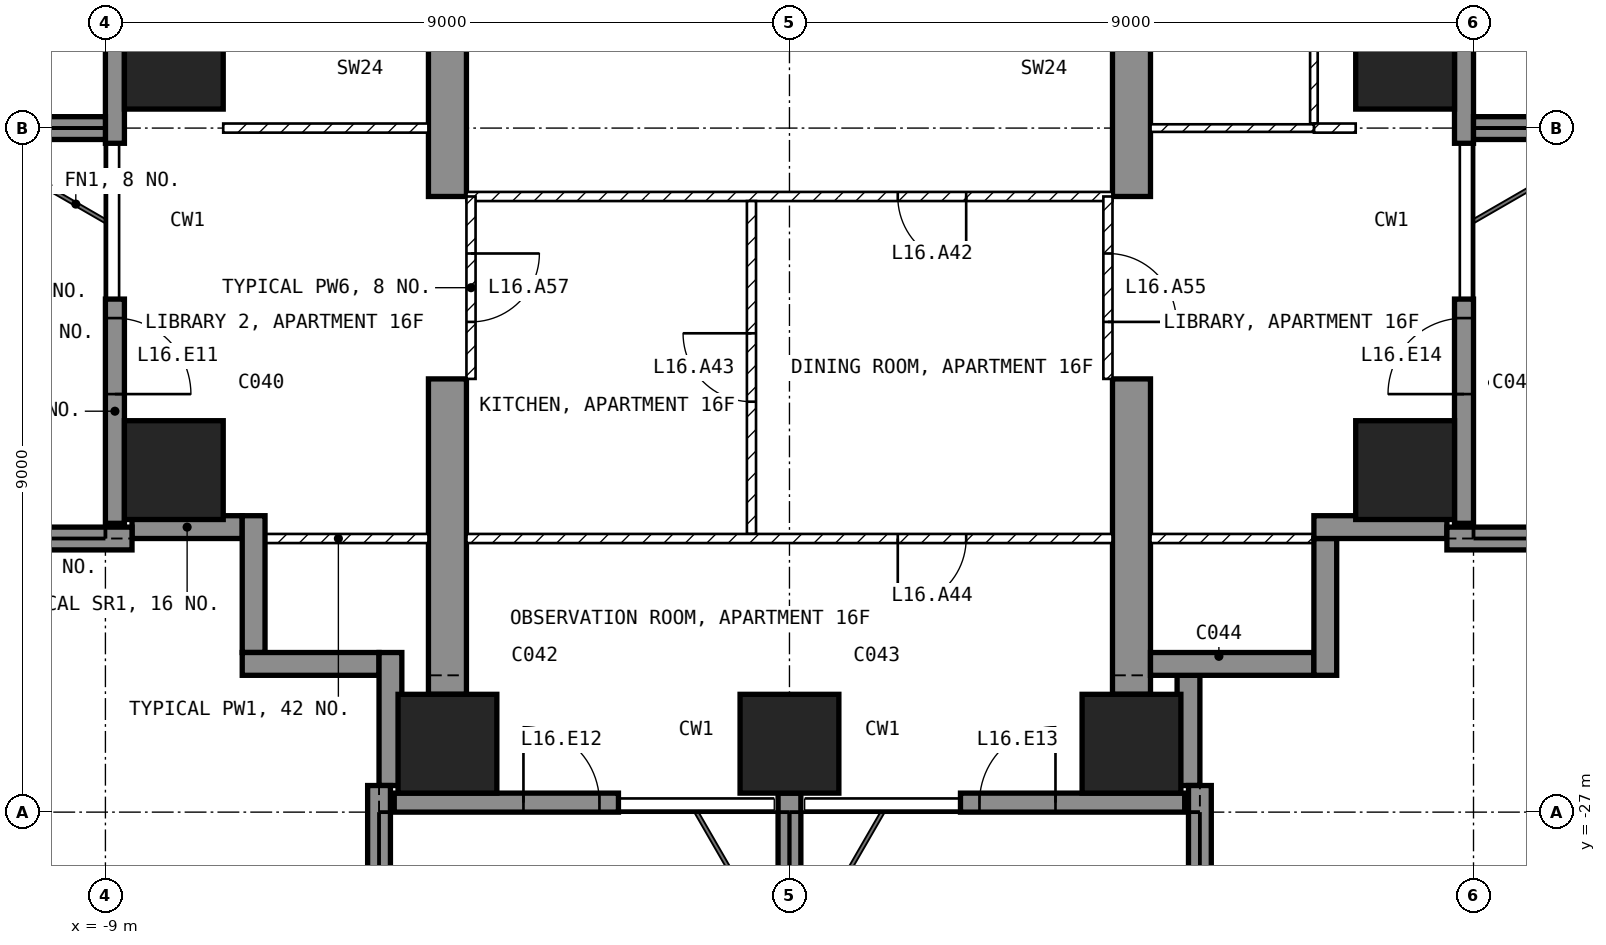
"""IFC4 building model, lengths in metres.
Left out: names, types, materials, properties, quantities, classifications, styles, units other than length and angle.
Written with IfcOpenShell. Run it as: python <this file> out.ifc"""

import sys

from ifc_helpers import new_model, si_unit, direction, frame, frame_2d, origin, origin_2d, place, context, subcontext, project, spatial, polyline, rectangle, outline, extrude, element, fill, save


model = new_model("IFC4")
c1 = context("Model", 3, precision=1e-05, world=origin(), true_north=direction((0.0, 1.0)))
c2 = subcontext(c1, "Body", "Model", "MODEL_VIEW")
j1 = project(units=[si_unit("LENGTHUNIT", "METRE"), si_unit("PLANEANGLEUNIT", "RADIAN")], contexts=[c1])
p1 = place(None, origin())
s1 = spatial("IfcSite", under=j1, at=p1, CompositionType="ELEMENT")
p2 = place(p1, origin())
s2 = spatial("IfcBuilding", under=s1, at=p2, CompositionType="ELEMENT")
p3 = place(p2, frame((0.0, 0.0, 75.0)))
s3 = spatial("IfcBuildingStorey", under=s2, at=p3, CompositionType="ELEMENT", Elevation=75.0)
for number, where, z_axis, x_axis in (
    (1, (-8.1, -22.5, -0.25), (0.0, 0.0, 1.0), (1.0, 0.0, 0.0)),
    (2, (-8.1, -17.1, -0.25), (0.0, 0.0, 1.0), (1.0, 0.0, 0.0)),
    (3, (-4.5, -26.1, -0.25), (0.0, 0.0, 1.0), (1.0, 0.0, 0.0)),
    (4, (0.0, -26.1, -0.25), (0.0, 0.0, 1.0), (1.0, 0.0, 0.0)),
    (5, (4.5, -26.1, -0.25), (0.0, 0.0, 1.0), (1.0, 0.0, 0.0)),
    (6, (8.1, -22.5, -0.25), (0.0, 0.0, 1.0), (1.0, 0.0, 0.0)),
    (7, (8.1, -17.1, -0.25), (0.0, 0.0, 1.0), (1.0, 0.0, 0.0)),
):
    element("IfcColumn", number, at=place(p3, frame(where, z_axis=z_axis, x_axis=x_axis)), inside=s3, PredefinedType="COLUMN", context=c2, shape_type="SweptSolid", body=[
        extrude(rectangle(XDim=1.3, YDim=1.3, at=origin_2d()), origin(), (0.0, 0.0, 1.0), 3.5),
    ])
for number, where, z_axis, x_axis in (
    (8, (-4.75, -25.45, -0.25), (1.0, 0.0, 0.0), (0.0, 1.0, 0.0)),
    (9, (4.25, -25.45, -0.25), (1.0, 0.0, 0.0), (0.0, 1.0, 0.0)),
):
    element("IfcWall", number, at=place(p3, frame(where, z_axis=z_axis, x_axis=x_axis)), inside=s3, PredefinedType="SHEAR", context=c2, shape_type="SweptSolid", body=[
        extrude(outline(polyline([(0.0, 0.0), (4.15, 0.0), (4.15, 2.65), (6.55, 2.65), (6.55, 0.0), (11.95, 0.0), (11.95, 2.65), (14.35, 2.65), (14.35, 0.0), (16.45, 0.0), (16.45, 3.5), (0.0, 3.5), (0.0, 0.0)])), origin(), (0.0, 0.0, 1.0), 0.5),
    ])
p4 = place(p3, frame((-8.875, -14.65, 0.0), z_axis=(0.0, 0.0, 1.0), x_axis=(0.0, -1.0, 0.0)))
e10 = element("IfcWall", 10, at=p4, inside=s3, PredefinedType="SOLIDWALL", context=c2, shape_type="SweptSolid", body=[
    extrude(rectangle(XDim=3.55, YDim=0.25, at=frame_2d((1.775, 0.0))), origin(), (0.0, 0.0, 1.0), 3.25),
])
p5 = place(p4, frame((0.25, 0.0, 0.0)))
e11 = element("IfcOpeningElement", 11, at=p5, cuts=e10, PredefinedType="OPENING", context=c2, shape_type="SweptSolid", body=[
    extrude(rectangle(XDim=1.2, YDim=2.4, at=frame_2d((0.6, 1.2))), frame((0.0, 0.135, 0.0), z_axis=(0.0, -1.0, 0.0), x_axis=(1.0, 0.0, 0.0)), (0.0, 0.0, 1.0), 0.27),
])
p6 = place(p3, frame((-8.875, -20.25, 0.0), z_axis=(0.0, 0.0, 1.0), x_axis=(0.0, -1.0, 0.0)))
e12 = element("IfcWall", 12, at=p6, inside=s3, PredefinedType="SOLIDWALL", context=c2, shape_type="SweptSolid", body=[
    extrude(rectangle(XDim=2.95, YDim=0.25, at=frame_2d((1.475, 0.0))), origin(), (0.0, 0.0, 1.0), 3.25),
])
p7 = place(p6, frame((0.25, 0.0, 0.0)))
e13 = element("IfcOpeningElement", 13, at=p7, cuts=e12, PredefinedType="OPENING", context=c2, shape_type="SweptSolid", body=[
    extrude(rectangle(XDim=1.0, YDim=2.4, at=frame_2d((0.5, 1.2))), frame((0.0, 0.135, 0.0), z_axis=(0.0, -1.0, 0.0), x_axis=(1.0, 0.0, 0.0)), (0.0, 0.0, 1.0), 0.27),
])
p8 = place(p3, frame((-5.2, -26.875, 0.0), z_axis=(0.0, 0.0, 1.0), x_axis=(1.0, 0.0, 0.0)))
e14 = element("IfcWall", 14, at=p8, inside=s3, PredefinedType="SOLIDWALL", context=c2, shape_type="SweptSolid", body=[
    extrude(rectangle(XDim=2.95, YDim=0.25, at=frame_2d((1.475, 0.0))), origin(), (0.0, 0.0, 1.0), 3.25),
])
p9 = place(p8, frame((1.7, 0.0, 0.0)))
e15 = element("IfcOpeningElement", 15, at=p9, cuts=e14, PredefinedType="OPENING", context=c2, shape_type="SweptSolid", body=[
    extrude(rectangle(XDim=1.0, YDim=2.4, at=frame_2d((0.5, 1.2))), frame((0.0, 0.135, 0.0), z_axis=(0.0, -1.0, 0.0), x_axis=(1.0, 0.0, 0.0)), (0.0, 0.0, 1.0), 0.27),
])
p10 = place(p3, frame((2.25, -26.875, 0.0), z_axis=(0.0, 0.0, 1.0), x_axis=(1.0, 0.0, 0.0)))
e16 = element("IfcWall", 16, at=p10, inside=s3, PredefinedType="SOLIDWALL", context=c2, shape_type="SweptSolid", body=[
    extrude(rectangle(XDim=2.95, YDim=0.25, at=frame_2d((1.475, 0.0))), origin(), (0.0, 0.0, 1.0), 3.25),
])
p11 = place(p10, frame((0.25, 0.0, 0.0)))
e17 = element("IfcOpeningElement", 17, at=p11, cuts=e16, PredefinedType="OPENING", context=c2, shape_type="SweptSolid", body=[
    extrude(rectangle(XDim=1.0, YDim=2.4, at=frame_2d((0.5, 1.2))), frame((0.0, 0.135, 0.0), z_axis=(0.0, -1.0, 0.0), x_axis=(1.0, 0.0, 0.0)), (0.0, 0.0, 1.0), 0.27),
])
p12 = place(p3, frame((8.875, -23.2, 0.0), z_axis=(0.0, 0.0, 1.0), x_axis=(0.0, 1.0, 0.0)))
e18 = element("IfcWall", 18, at=p12, inside=s3, PredefinedType="SOLIDWALL", context=c2, shape_type="SweptSolid", body=[
    extrude(rectangle(XDim=2.95, YDim=0.25, at=frame_2d((1.475, 0.0))), origin(), (0.0, 0.0, 1.0), 3.25),
])
p13 = place(p12, frame((1.7, 0.0, 0.0)))
e19 = element("IfcOpeningElement", 19, at=p13, cuts=e18, PredefinedType="OPENING", context=c2, shape_type="SweptSolid", body=[
    extrude(rectangle(XDim=1.0, YDim=2.4, at=frame_2d((0.5, 1.2))), frame((0.0, 0.135, 0.0), z_axis=(0.0, -1.0, 0.0), x_axis=(1.0, 0.0, 0.0)), (0.0, 0.0, 1.0), 0.27),
])
p14 = place(p3, frame((8.875, -18.2, 0.0), z_axis=(0.0, 0.0, 1.0), x_axis=(0.0, 1.0, 0.0)))
e20 = element("IfcWall", 20, at=p14, inside=s3, PredefinedType="SOLIDWALL", context=c2, shape_type="SweptSolid", body=[
    extrude(rectangle(XDim=3.55, YDim=0.25, at=frame_2d((1.775, 0.0))), origin(), (0.0, 0.0, 1.0), 3.25),
])
p15 = place(p14, frame((2.1, 0.0, 0.0)))
e21 = element("IfcOpeningElement", 21, at=p15, cuts=e20, PredefinedType="OPENING", context=c2, shape_type="SweptSolid", body=[
    extrude(rectangle(XDim=1.2, YDim=2.4, at=frame_2d((0.6, 1.2))), frame((0.0, 0.135, 0.0), z_axis=(0.0, -1.0, 0.0), x_axis=(1.0, 0.0, 0.0)), (0.0, 0.0, 1.0), 0.27),
])
p16 = place(p3, frame((5.25, -26.65, 0.0), z_axis=(0.0, 0.0, 1.0), x_axis=(0.0, 1.0, 0.0)))
e22 = element("IfcWall", 22, at=p16, inside=s3, PredefinedType="SOLIDWALL", context=c2, shape_type="SweptSolid", body=[
    extrude(rectangle(XDim=1.45, YDim=0.3, at=frame_2d((0.725, 0.0))), origin(), (0.0, 0.0, 1.0), 3.25),
])
p17 = place(p3, frame((4.75, -25.05, 0.0), z_axis=(0.0, 0.0, 1.0), x_axis=(1.0, 0.0, 0.0)))
e23 = element("IfcWall", 23, at=p17, inside=s3, PredefinedType="SOLIDWALL", context=c2, shape_type="SweptSolid", body=[
    extrude(rectangle(XDim=2.15, YDim=0.3, at=frame_2d((1.075, 0.0))), origin(), (0.0, 0.0, 1.0), 3.25),
])
p18 = place(p3, frame((7.05, -25.2, 0.0), z_axis=(0.0, 0.0, 1.0), x_axis=(0.0, 1.0, 0.0)))
e24 = element("IfcWall", 24, at=p18, inside=s3, PredefinedType="SOLIDWALL", context=c2, shape_type="SweptSolid", body=[
    extrude(rectangle(XDim=1.8, YDim=0.3, at=frame_2d((0.9, 0.0))), origin(), (0.0, 0.0, 1.0), 3.25),
])
p19 = place(p3, frame((6.9, -23.25, 0.0), z_axis=(0.0, 0.0, 1.0), x_axis=(1.0, 0.0, 0.0)))
e25 = element("IfcWall", 25, at=p19, inside=s3, PredefinedType="SOLIDWALL", context=c2, shape_type="SweptSolid", body=[
    extrude(rectangle(XDim=1.75, YDim=0.3, at=frame_2d((0.875, 0.0))), origin(), (0.0, 0.0, 1.0), 3.25),
])
p20 = place(p3, frame((-8.65, -23.25, 0.0), z_axis=(0.0, 0.0, 1.0), x_axis=(1.0, 0.0, 0.0)))
e26 = element("IfcWall", 26, at=p20, inside=s3, PredefinedType="SOLIDWALL", context=c2, shape_type="SweptSolid", body=[
    extrude(rectangle(XDim=1.45, YDim=0.3, at=frame_2d((0.725, 0.0))), origin(), (0.0, 0.0, 1.0), 3.25),
])
p21 = place(p3, frame((-7.05, -23.1, 0.0), z_axis=(0.0, 0.0, 1.0), x_axis=(0.0, -1.0, 0.0)))
e27 = element("IfcWall", 27, at=p21, inside=s3, PredefinedType="SOLIDWALL", context=c2, shape_type="SweptSolid", body=[
    extrude(rectangle(XDim=1.8, YDim=0.3, at=frame_2d((0.9, 0.0))), origin(), (0.0, 0.0, 1.0), 3.25),
])
p22 = place(p3, frame((-7.2, -25.05, 0.0), z_axis=(0.0, 0.0, 1.0), x_axis=(1.0, 0.0, 0.0)))
e28 = element("IfcWall", 28, at=p22, inside=s3, PredefinedType="SOLIDWALL", context=c2, shape_type="SweptSolid", body=[
    extrude(rectangle(XDim=1.8, YDim=0.3, at=frame_2d((0.9, 0.0))), origin(), (0.0, 0.0, 1.0), 3.25),
])
p23 = place(p3, frame((-5.25, -24.9, 0.0), z_axis=(0.0, 0.0, 1.0), x_axis=(0.0, -1.0, 0.0)))
e29 = element("IfcWall", 29, at=p23, inside=s3, PredefinedType="SOLIDWALL", context=c2, shape_type="SweptSolid", body=[
    extrude(rectangle(XDim=1.75, YDim=0.3, at=frame_2d((0.875, 0.0))), origin(), (0.0, 0.0, 1.0), 3.25),
])
p24 = place(p3, frame((-8.65, -23.4, 0.0), z_axis=(0.0, 0.0, 1.0), x_axis=(-1.0, 0.0, 0.0)))
e30 = element("IfcWall", 30, at=p24, inside=s3, PredefinedType="SOLIDWALL", context=c2, shape_type="SweptSolid", body=[
    extrude(rectangle(XDim=3.05, YDim=0.3, at=frame_2d((1.525, 0.0))), origin(), (0.0, 0.0, 1.0), 3.25),
])
p25 = place(p3, frame((-9.0, -18.0, 0.0), z_axis=(0.0, 0.0, 1.0), x_axis=(-1.0, 0.0, 0.0)))
e31 = element("IfcWall", 31, at=p25, inside=s3, PredefinedType="SOLIDWALL", context=c2, shape_type="SweptSolid", body=[
    extrude(rectangle(XDim=2.7, YDim=0.3, at=frame_2d((1.35, 0.0))), origin(), (0.0, 0.0, 1.0), 3.25),
])
p26 = place(p3, frame((-5.4, -26.65, 0.0), z_axis=(0.0, 0.0, 1.0), x_axis=(0.0, -1.0, 0.0)))
e32 = element("IfcWall", 32, at=p26, inside=s3, PredefinedType="SOLIDWALL", context=c2, shape_type="SweptSolid", body=[
    extrude(rectangle(XDim=3.05, YDim=0.3, at=frame_2d((1.525, 0.0))), origin(), (0.0, 0.0, 1.0), 3.25),
])
p27 = place(p3, frame((0.0, -26.75, 0.0), z_axis=(0.0, 0.0, 1.0), x_axis=(0.0, -1.0, 0.0)))
e33 = element("IfcWall", 33, at=p27, inside=s3, PredefinedType="SOLIDWALL", context=c2, shape_type="SweptSolid", body=[
    extrude(rectangle(XDim=2.95, YDim=0.3, at=frame_2d((1.475, 0.0))), origin(), (0.0, 0.0, 1.0), 3.25),
])
for number, where, z_axis, x_axis in (
    (34, (5.4, -26.65, 0.0), (0.0, 0.0, 1.0), (0.0, -1.0, 0.0)),
    (35, (8.65, -23.4, 0.0), (0.0, 0.0, 1.0), (1.0, 0.0, 0.0)),
):
    element("IfcWall", number, at=place(p3, frame(where, z_axis=z_axis, x_axis=x_axis)), inside=s3, PredefinedType="SOLIDWALL", context=c2, shape_type="SweptSolid", body=[
        extrude(rectangle(XDim=3.05, YDim=0.3, at=frame_2d((1.525, 0.0))), origin(), (0.0, 0.0, 1.0), 3.25),
    ])
p28 = place(p3, frame((9.0, -18.0, 0.0), z_axis=(0.0, 0.0, 1.0), x_axis=(1.0, 0.0, 0.0)))
e36 = element("IfcWall", 36, at=p28, inside=s3, PredefinedType="SOLIDWALL", context=c2, shape_type="SweptSolid", body=[
    extrude(rectangle(XDim=2.7, YDim=0.3, at=frame_2d((1.35, 0.0))), origin(), (0.0, 0.0, 1.0), 3.25),
])
p29 = place(p3, frame((4.25, -18.9, 0.0), z_axis=(0.0, 0.0, 1.0), x_axis=(-1.0, 0.0, 0.0)))
e37 = element("IfcWall", 37, at=p29, inside=s3, PredefinedType="PARTITIONING", context=c2, shape_type="SweptSolid", body=[
    extrude(rectangle(XDim=8.5, YDim=0.12, at=frame_2d((4.25, 0.0))), origin(), (0.0, 0.0, 1.0), 3.25),
])
p30 = place(p29, frame((1.925, 0.0, 0.0)))
e38 = element("IfcOpeningElement", 38, at=p30, cuts=e37, PredefinedType="OPENING", context=c2, shape_type="SweptSolid", body=[
    extrude(rectangle(XDim=0.9, YDim=2.1, at=frame_2d((0.45, 1.05))), frame((0.0, 0.07, 0.0), z_axis=(0.0, -1.0, 0.0), x_axis=(1.0, 0.0, 0.0)), (0.0, 0.0, 1.0), 0.14),
])
p31 = place(p3, frame((-0.5, -23.34, 0.0), z_axis=(0.0, 0.0, 1.0), x_axis=(0.0, 1.0, 0.0)))
e39 = element("IfcWall", 39, at=p31, inside=s3, PredefinedType="PARTITIONING", context=c2, shape_type="SweptSolid", body=[
    extrude(rectangle(XDim=4.38, YDim=0.12, at=frame_2d((2.19, 0.0))), origin(), (0.0, 0.0, 1.0), 3.25),
])
p32 = place(p31, frame((1.74, 0.0, 0.0)))
e40 = element("IfcOpeningElement", 40, at=p32, cuts=e39, PredefinedType="OPENING", context=c2, shape_type="SweptSolid", body=[
    extrude(rectangle(XDim=0.9, YDim=2.1, at=frame_2d((0.45, 1.05))), frame((0.0, 0.07, 0.0), z_axis=(0.0, -1.0, 0.0), x_axis=(1.0, 0.0, 0.0)), (0.0, 0.0, 1.0), 0.14),
])
p33 = place(p3, frame((4.25, -23.4, 0.0), z_axis=(0.0, 0.0, 1.0), x_axis=(-1.0, 0.0, 0.0)))
e41 = element("IfcWall", 41, at=p33, inside=s3, PredefinedType="PARTITIONING", context=c2, shape_type="SweptSolid", body=[
    extrude(rectangle(XDim=8.5, YDim=0.12, at=frame_2d((4.25, 0.0))), origin(), (0.0, 0.0, 1.0), 3.25),
])
p34 = place(p33, frame((1.925, 0.0, 0.0)))
e42 = element("IfcOpeningElement", 42, at=p34, cuts=e41, PredefinedType="OPENING", context=c2, shape_type="SweptSolid", body=[
    extrude(rectangle(XDim=0.9, YDim=2.1, at=frame_2d((0.45, 1.05))), frame((0.0, 0.07, 0.0), z_axis=(0.0, -1.0, 0.0), x_axis=(1.0, 0.0, 0.0)), (0.0, 0.0, 1.0), 0.14),
])
p35 = place(p3, frame((6.9, -17.94, 0.0), z_axis=(0.0, 0.0, 1.0), x_axis=(0.0, 1.0, 0.0)))
e43 = element("IfcWall", 43, at=p35, inside=s3, PredefinedType="PARTITIONING", context=c2, shape_type="SweptSolid", body=[
    extrude(rectangle(XDim=3.49, YDim=0.1, at=frame_2d((1.745, 0.0))), origin(), (0.0, 0.0, 1.0), 3.25),
])
p36 = place(p3, frame((7.45, -18.0, 0.0), z_axis=(0.0, 0.0, 1.0), x_axis=(-1.0, 0.0, 0.0)))
e44 = element("IfcWall", 44, at=p36, inside=s3, PredefinedType="PARTITIONING", context=c2, shape_type="SweptSolid", body=[
    extrude(rectangle(XDim=0.55, YDim=0.12, at=frame_2d((0.275, 0.0))), origin(), (0.0, 0.0, 1.0), 3.25),
])
p37 = place(p3, frame((6.9, -18.0, 0.0), z_axis=(0.0, 0.0, 1.0), x_axis=(-1.0, 0.0, 0.0)))
e45 = element("IfcWall", 45, at=p37, inside=s3, PredefinedType="PARTITIONING", context=c2, shape_type="SweptSolid", body=[
    extrude(rectangle(XDim=2.15, YDim=0.1, at=frame_2d((1.075, 0.0))), origin(), (0.0, 0.0, 1.0), 3.25),
])
p38 = place(p3, frame((7.12, -23.4, 0.0), z_axis=(0.0, 0.0, 1.0), x_axis=(-1.0, 0.0, 0.0)))
e46 = element("IfcWall", 46, at=p38, inside=s3, PredefinedType="PARTITIONING", context=c2, shape_type="SweptSolid", body=[
    extrude(rectangle(XDim=2.37, YDim=0.12, at=frame_2d((1.185, 0.0))), origin(), (0.0, 0.0, 1.0), 3.25),
])
p39 = place(p3, frame((-4.75, -18.0, 0.0), z_axis=(0.0, 0.0, 1.0), x_axis=(-1.0, 0.0, 0.0)))
e47 = element("IfcWall", 47, at=p39, inside=s3, PredefinedType="PARTITIONING", context=c2, shape_type="SweptSolid", body=[
    extrude(rectangle(XDim=2.7, YDim=0.12, at=frame_2d((1.35, 0.0))), origin(), (0.0, 0.0, 1.0), 3.25),
])
p40 = place(p3, frame((-4.75, -23.4, 0.0), z_axis=(0.0, 0.0, 1.0), x_axis=(-1.0, 0.0, 0.0)))
e48 = element("IfcWall", 48, at=p40, inside=s3, PredefinedType="PARTITIONING", context=c2, shape_type="SweptSolid", body=[
    extrude(rectangle(XDim=2.37, YDim=0.12, at=frame_2d((1.185, 0.0))), origin(), (0.0, 0.0, 1.0), 3.25),
])
p41 = place(p3, frame((4.19, -18.9, 0.0), z_axis=(0.0, 0.0, 1.0), x_axis=(0.0, -1.0, 0.0)))
e49 = element("IfcWall", 49, at=p41, inside=s3, PredefinedType="PARTITIONING", context=c2, shape_type="SweptSolid", body=[
    extrude(rectangle(XDim=2.4, YDim=0.12, at=frame_2d((1.2, 0.0))), origin(), (0.0, 0.0, 1.0), 2.4),
])
p42 = place(p41, frame((0.75, 0.0, 0.0)))
e50 = element("IfcOpeningElement", 50, at=p42, cuts=e49, PredefinedType="OPENING", context=c2, shape_type="SweptSolid", body=[
    extrude(rectangle(XDim=0.9, YDim=2.1, at=frame_2d((0.45, 1.05))), frame((0.0, 0.07, 0.0), z_axis=(0.0, -1.0, 0.0), x_axis=(1.0, 0.0, 0.0)), (0.0, 0.0, 1.0), 0.14),
])
p43 = place(p3, frame((-4.19, -18.9, 0.0), z_axis=(0.0, 0.0, 1.0), x_axis=(0.0, -1.0, 0.0)))
e51 = element("IfcWall", 51, at=p43, inside=s3, PredefinedType="PARTITIONING", context=c2, shape_type="SweptSolid", body=[
    extrude(rectangle(XDim=2.4, YDim=0.12, at=frame_2d((1.2, 0.0))), origin(), (0.0, 0.0, 1.0), 2.4),
])
p44 = place(p43, frame((0.75, 0.0, 0.0)))
e52 = element("IfcOpeningElement", 52, at=p44, cuts=e51, PredefinedType="OPENING", context=c2, shape_type="SweptSolid", body=[
    extrude(rectangle(XDim=0.9, YDim=2.1, at=frame_2d((0.45, 1.05))), frame((0.0, 0.07, 0.0), z_axis=(0.0, -1.0, 0.0), x_axis=(1.0, 0.0, 0.0)), (0.0, 0.0, 1.0), 0.14),
])
p45 = place(p7, origin())
e53 = element("IfcDoor", 53, at=p45, inside=s3, OperationType="SINGLE_SWING_RIGHT", PredefinedType="DOOR", context=c2, shape_type="SweptSolid", body=[
    extrude(rectangle(XDim=1.0, YDim=2.4, at=frame_2d((0.5, 1.2))), frame((0.0, 0.025, 0.0), z_axis=(0.0, -1.0, 0.0), x_axis=(1.0, 0.0, 0.0)), (0.0, 0.0, 1.0), 0.05),
])
fill(e13, e53)
p46 = place(p9, origin())
e54 = element("IfcDoor", 54, at=p46, inside=s3, OperationType="SINGLE_SWING_LEFT", PredefinedType="DOOR", context=c2, shape_type="SweptSolid", body=[
    extrude(rectangle(XDim=1.0, YDim=2.4, at=frame_2d((0.5, 1.2))), frame((0.0, 0.025, 0.0), z_axis=(0.0, -1.0, 0.0), x_axis=(1.0, 0.0, 0.0)), (0.0, 0.0, 1.0), 0.05),
])
fill(e15, e54)
p47 = place(p11, origin())
e55 = element("IfcDoor", 55, at=p47, inside=s3, OperationType="SINGLE_SWING_RIGHT", PredefinedType="DOOR", context=c2, shape_type="SweptSolid", body=[
    extrude(rectangle(XDim=1.0, YDim=2.4, at=frame_2d((0.5, 1.2))), frame((0.0, 0.025, 0.0), z_axis=(0.0, -1.0, 0.0), x_axis=(1.0, 0.0, 0.0)), (0.0, 0.0, 1.0), 0.05),
])
fill(e17, e55)
p48 = place(p13, origin())
e56 = element("IfcDoor", 56, at=p48, inside=s3, OperationType="SINGLE_SWING_LEFT", PredefinedType="DOOR", context=c2, shape_type="SweptSolid", body=[
    extrude(rectangle(XDim=1.0, YDim=2.4, at=frame_2d((0.5, 1.2))), frame((0.0, 0.025, 0.0), z_axis=(0.0, -1.0, 0.0), x_axis=(1.0, 0.0, 0.0)), (0.0, 0.0, 1.0), 0.05),
])
fill(e19, e56)
p49 = place(p30, origin())
e57 = element("IfcDoor", 57, at=p49, inside=s3, OperationType="SINGLE_SWING_LEFT", PredefinedType="DOOR", context=c2, shape_type="SweptSolid", body=[
    extrude(rectangle(XDim=0.9, YDim=2.1, at=frame_2d((0.45, 1.05))), frame((0.0, 0.025, 0.0), z_axis=(0.0, -1.0, 0.0), x_axis=(1.0, 0.0, 0.0)), (0.0, 0.0, 1.0), 0.05),
])
fill(e38, e57)
p50 = place(p32, origin())
e58 = element("IfcDoor", 58, at=p50, inside=s3, OperationType="SINGLE_SWING_RIGHT", PredefinedType="DOOR", context=c2, shape_type="SweptSolid", body=[
    extrude(rectangle(XDim=0.9, YDim=2.1, at=frame_2d((0.45, 1.05))), frame((0.0, 0.025, 0.0), z_axis=(0.0, -1.0, 0.0), x_axis=(1.0, 0.0, 0.0)), (0.0, 0.0, 1.0), 0.05),
])
fill(e40, e58)
p51 = place(p34, origin())
e59 = element("IfcDoor", 59, at=p51, inside=s3, OperationType="SINGLE_SWING_RIGHT", PredefinedType="DOOR", context=c2, shape_type="SweptSolid", body=[
    extrude(rectangle(XDim=0.9, YDim=2.1, at=frame_2d((0.45, 1.05))), frame((0.0, 0.025, 0.0), z_axis=(0.0, -1.0, 0.0), x_axis=(1.0, 0.0, 0.0)), (0.0, 0.0, 1.0), 0.05),
])
fill(e42, e59)
p52 = place(p42, origin())
e60 = element("IfcDoor", 60, at=p52, inside=s3, OperationType="SINGLE_SWING_RIGHT", PredefinedType="DOOR", context=c2, shape_type="SweptSolid", body=[
    extrude(rectangle(XDim=0.9, YDim=2.1, at=frame_2d((0.45, 1.05))), frame((0.0, 0.025, 0.0), z_axis=(0.0, -1.0, 0.0), x_axis=(1.0, 0.0, 0.0)), (0.0, 0.0, 1.0), 0.05),
])
fill(e50, e60)
p53 = place(p44, origin())
e61 = element("IfcDoor", 61, at=p53, inside=s3, OperationType="SINGLE_SWING_LEFT", PredefinedType="DOOR", context=c2, shape_type="SweptSolid", body=[
    extrude(rectangle(XDim=0.9, YDim=2.1, at=frame_2d((0.45, 1.05))), frame((0.0, 0.025, 0.0), z_axis=(0.0, -1.0, 0.0), x_axis=(1.0, 0.0, 0.0)), (0.0, 0.0, 1.0), 0.05),
])
fill(e52, e61)
save(model, sys.argv[1])
